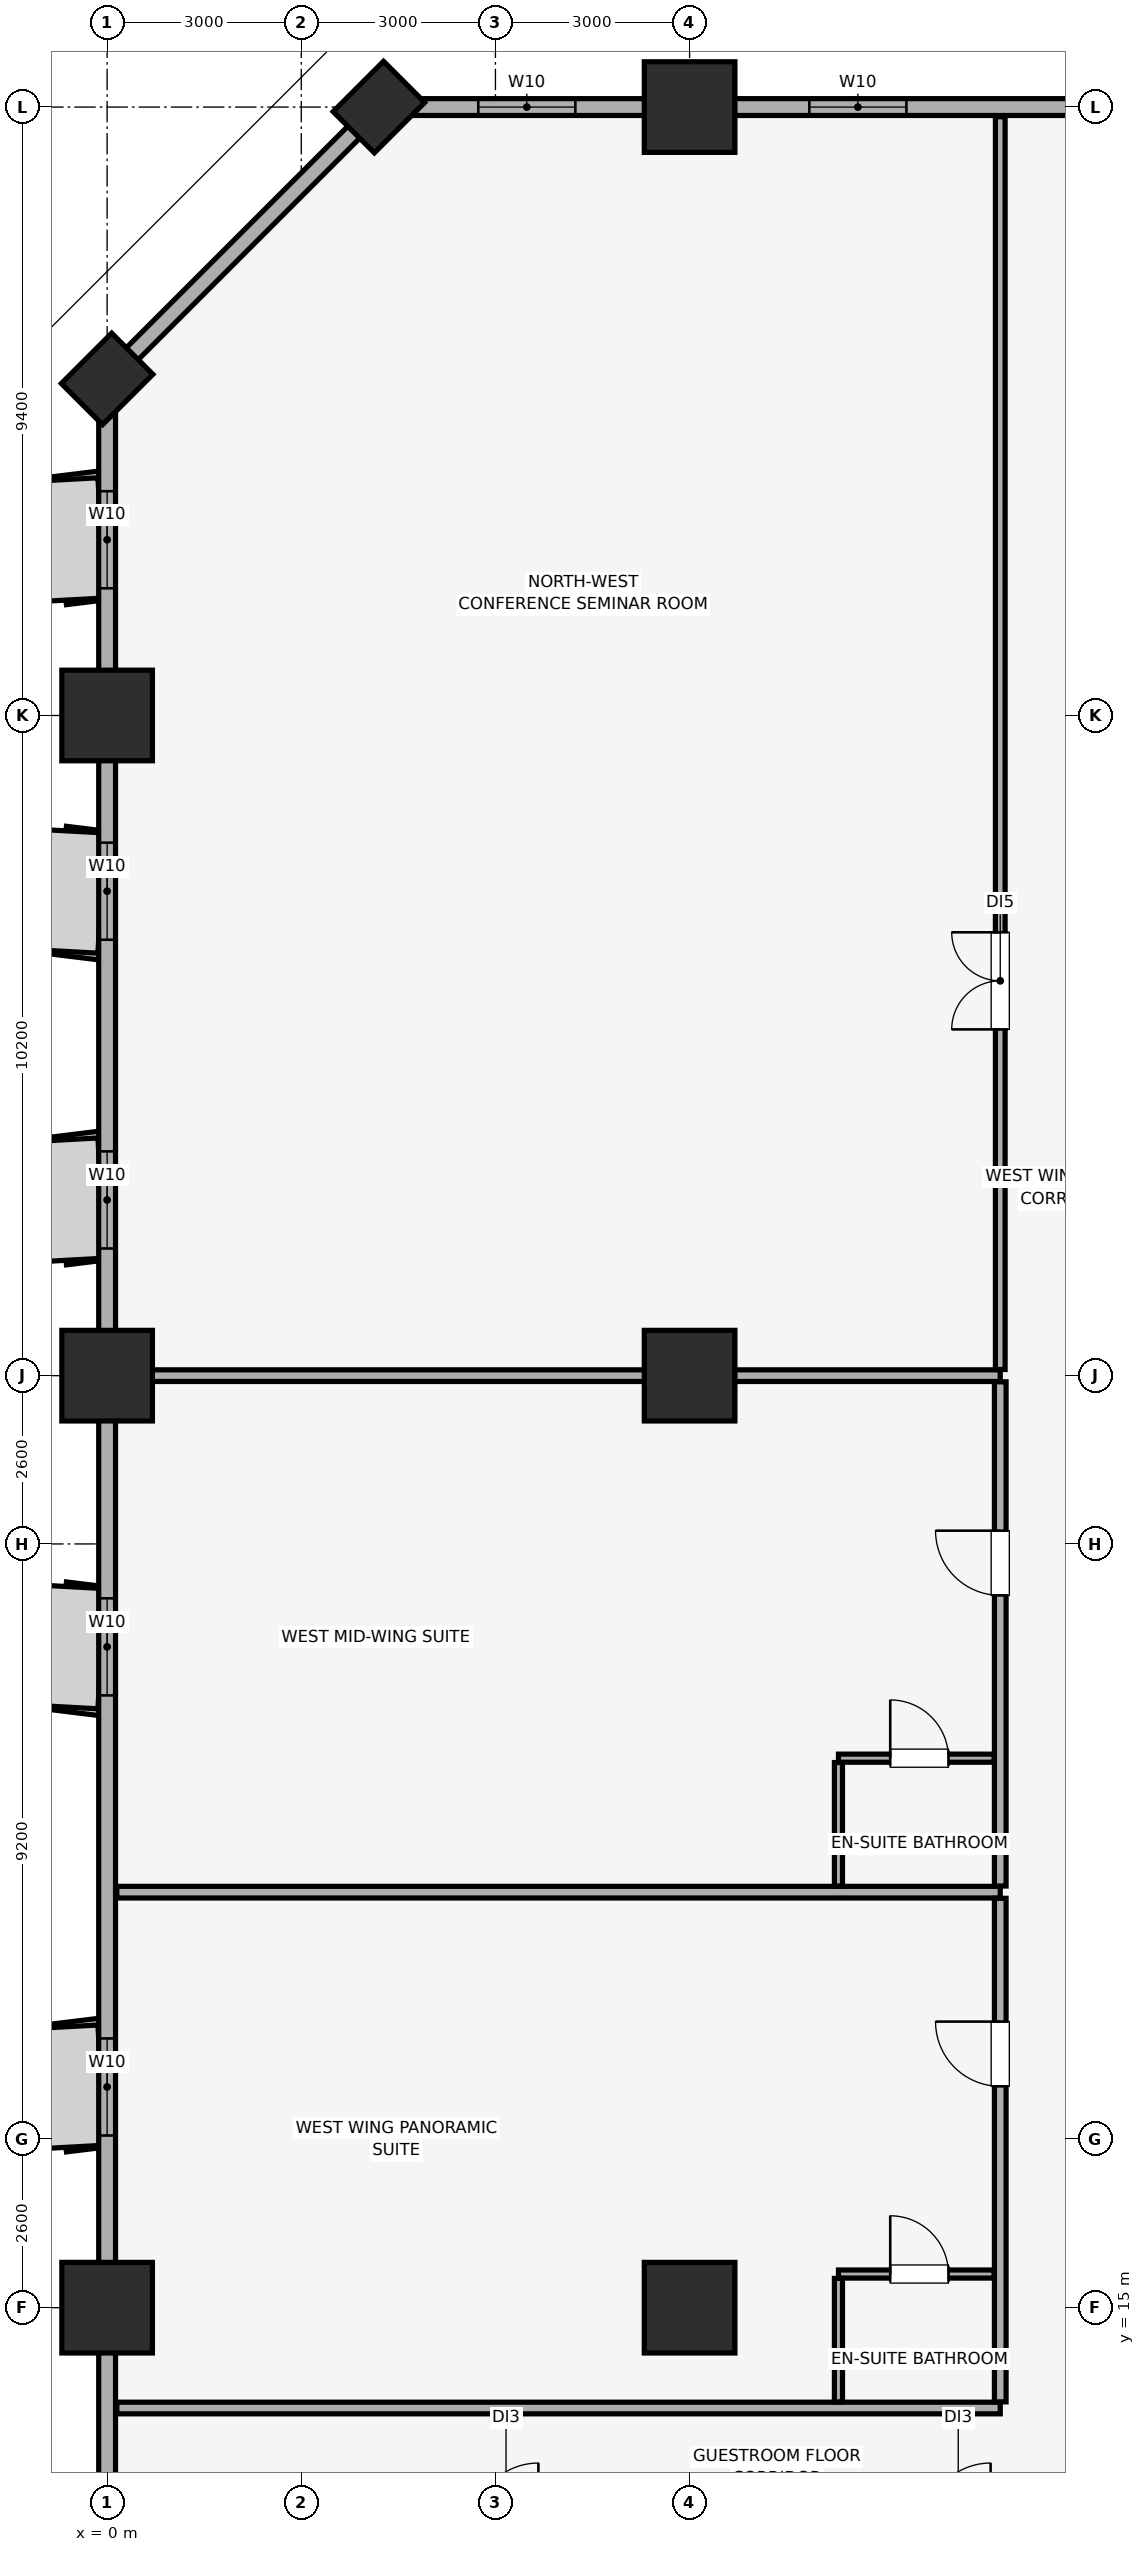
"""IFC4 building model, lengths in metres.
Left out: names, types, materials, properties, quantities, classifications, styles, units other than length and angle.
Written with IfcOpenShell. Run it as: python <this file> out.ifc"""

import sys

from ifc_helpers import new_model, si_unit, direction, frame, frame_2d, origin, origin_2d, place, context, subcontext, project, spatial, rectangle, extrude, element, fill, save


model = new_model("IFC4")
c1 = context("Model", 3, precision=1e-05, world=origin(), true_north=direction((0.0, 1.0)))
c2 = subcontext(c1, "Body", "Model", "MODEL_VIEW")
j1 = project(units=[si_unit("LENGTHUNIT", "METRE"), si_unit("PLANEANGLEUNIT", "RADIAN")], contexts=[c1])
p1 = place(None, origin())
s1 = spatial("IfcSite", under=j1, at=p1, CompositionType="ELEMENT")
p2 = place(p1, origin())
s2 = spatial("IfcBuilding", under=s1, at=p2, CompositionType="ELEMENT")
p3 = place(p2, frame((0.0, 0.0, 57.65)))
s3 = spatial("IfcBuildingStorey", under=s2, at=p3, CompositionType="ELEMENT", Elevation=57.65)
for number, where, z_axis, x_axis in (
    (1, (0.0, 15.0, 0.0), (0.0, 0.0, 1.0), (1.0, 0.0, 0.0)),
    (2, (0.0, 29.4, 0.0), (0.0, 0.0, 1.0), (1.0, 0.0, 0.0)),
    (3, (0.0, 39.6, 0.0), (0.0, 0.0, 1.0), (1.0, 0.0, 0.0)),
):
    element("IfcColumn", number, at=place(p3, frame(where, z_axis=z_axis, x_axis=x_axis)), inside=s3, PredefinedType="COLUMN", context=c2, shape_type="SweptSolid", body=[
        extrude(rectangle(XDim=1.4, YDim=1.4, at=origin_2d()), origin(), (0.0, 0.0, 1.0), 3.51),
    ])
for number, where, z_axis, x_axis in (
    (4, (4.2, 49.0, 0.0), (0.0, 0.0, 1.0), (0.707, 0.707, 0.0)),
    (5, (0.0, 44.8, 0.0), (0.0, 0.0, 1.0), (0.707, 0.707, 0.0)),
):
    element("IfcColumn", number, at=place(p3, frame(where, z_axis=z_axis, x_axis=x_axis)), inside=s3, PredefinedType="PILASTER", context=c2, shape_type="SweptSolid", body=[
        extrude(rectangle(XDim=1.1, YDim=0.9, at=origin_2d()), origin(), (0.0, 0.0, 1.0), 3.51),
    ])
for number, where, z_axis, x_axis in (
    (6, (9.0, 15.0, 0.0), (0.0, 0.0, 1.0), (1.0, 0.0, 0.0)),
    (7, (9.0, 29.4, 0.0), (0.0, 0.0, 1.0), (1.0, 0.0, 0.0)),
    (8, (9.0, 49.0, 0.0), (0.0, 0.0, 1.0), (1.0, 0.0, 0.0)),
):
    element("IfcColumn", number, at=place(p3, frame(where, z_axis=z_axis, x_axis=x_axis)), inside=s3, PredefinedType="COLUMN", context=c2, shape_type="SweptSolid", body=[
        extrude(rectangle(XDim=1.4, YDim=1.4, at=origin_2d()), origin(), (0.0, 0.0, 1.0), 3.51),
    ])
p4 = place(p3, frame((79.8, 49.0, 0.0), z_axis=(0.0, 0.0, 1.0), x_axis=(-1.0, 0.0, 0.0)))
e9 = element("IfcWall", 9, at=p4, inside=s3, PredefinedType="SOLIDWALL", context=c2, shape_type="SweptSolid", body=[
    extrude(rectangle(XDim=75.6, YDim=0.26, at=frame_2d((37.8, 0.0))), origin(), (0.0, 0.0, 1.0), 2.56),
])
p5 = place(p4, frame((72.565, 0.0, 0.85)))
e10 = element("IfcOpeningElement", 10, at=p5, cuts=e9, PredefinedType="OPENING", context=c2, shape_type="SweptSolid", body=[
    extrude(rectangle(XDim=1.5, YDim=1.4, at=frame_2d((0.75, 0.7))), frame((0.0, 0.14, 0.0), z_axis=(0.0, -1.0, 0.0), x_axis=(1.0, 0.0, 0.0)), (0.0, 0.0, 1.0), 0.28),
])
p6 = place(p4, frame((67.45, 0.0, 0.85)))
e11 = element("IfcOpeningElement", 11, at=p6, cuts=e9, PredefinedType="OPENING", context=c2, shape_type="SweptSolid", body=[
    extrude(rectangle(XDim=1.5, YDim=1.4, at=frame_2d((0.75, 0.7))), frame((0.0, 0.14, 0.0), z_axis=(0.0, -1.0, 0.0), x_axis=(1.0, 0.0, 0.0)), (0.0, 0.0, 1.0), 0.28),
])
p7 = place(p4, frame((7.6, 0.0, 0.85)))
e12 = element("IfcOpeningElement", 12, at=p7, cuts=e9, PredefinedType="OPENING", context=c2, shape_type="SweptSolid", body=[
    extrude(rectangle(XDim=1.5, YDim=1.4, at=frame_2d((0.75, 0.7))), frame((0.0, 0.14, 0.0), z_axis=(0.0, -1.0, 0.0), x_axis=(1.0, 0.0, 0.0)), (0.0, 0.0, 1.0), 0.28),
])
p8 = place(p4, frame((1.535, 0.0, 0.85)))
e13 = element("IfcOpeningElement", 13, at=p8, cuts=e9, PredefinedType="OPENING", context=c2, shape_type="SweptSolid", body=[
    extrude(rectangle(XDim=1.5, YDim=1.4, at=frame_2d((0.75, 0.7))), frame((0.0, 0.14, 0.0), z_axis=(0.0, -1.0, 0.0), x_axis=(1.0, 0.0, 0.0)), (0.0, 0.0, 1.0), 0.28),
])
p9 = place(p4, frame((52.265, 0.0, 0.9)))
e14 = element("IfcOpeningElement", 14, at=p9, cuts=e9, PredefinedType="OPENING", context=c2, shape_type="SweptSolid", body=[
    extrude(rectangle(XDim=1.5, YDim=1.4, at=frame_2d((0.75, 0.7))), frame((0.0, 0.14, 0.0), z_axis=(0.0, -1.0, 0.0), x_axis=(1.0, 0.0, 0.0)), (0.0, 0.0, 1.0), 0.28),
])
p10 = place(p4, frame((45.5, 0.0, 0.9)))
e15 = element("IfcOpeningElement", 15, at=p10, cuts=e9, PredefinedType="OPENING", context=c2, shape_type="SweptSolid", body=[
    extrude(rectangle(XDim=1.5, YDim=1.4, at=frame_2d((0.75, 0.7))), frame((0.0, 0.14, 0.0), z_axis=(0.0, -1.0, 0.0), x_axis=(1.0, 0.0, 0.0)), (0.0, 0.0, 1.0), 0.28),
])
p11 = place(p4, frame((31.05, 0.0, 0.9)))
e16 = element("IfcOpeningElement", 16, at=p11, cuts=e9, PredefinedType="OPENING", context=c2, shape_type="SweptSolid", body=[
    extrude(rectangle(XDim=1.5, YDim=1.4, at=frame_2d((0.75, 0.7))), frame((0.0, 0.14, 0.0), z_axis=(0.0, -1.0, 0.0), x_axis=(1.0, 0.0, 0.0)), (0.0, 0.0, 1.0), 0.28),
])
p12 = place(p4, frame((27.85, 0.0, 0.9)))
e17 = element("IfcOpeningElement", 17, at=p12, cuts=e9, PredefinedType="OPENING", context=c2, shape_type="SweptSolid", body=[
    extrude(rectangle(XDim=1.5, YDim=1.4, at=frame_2d((0.75, 0.7))), frame((0.0, 0.14, 0.0), z_axis=(0.0, -1.0, 0.0), x_axis=(1.0, 0.0, 0.0)), (0.0, 0.0, 1.0), 0.28),
])
p13 = place(p4, frame((23.485, 0.0, 0.9)))
e18 = element("IfcOpeningElement", 18, at=p13, cuts=e9, PredefinedType="OPENING", context=c2, shape_type="SweptSolid", body=[
    extrude(rectangle(XDim=1.5, YDim=1.4, at=frame_2d((0.75, 0.7))), frame((0.0, 0.14, 0.0), z_axis=(0.0, -1.0, 0.0), x_axis=(1.0, 0.0, 0.0)), (0.0, 0.0, 1.0), 0.28),
])
p14 = place(p3, frame((4.2, 49.0, 0.0), z_axis=(0.0, 0.0, 1.0), x_axis=(-0.707106781187, -0.707106781187, 0.0)))
e19 = element("IfcWall", 19, at=p14, inside=s3, PredefinedType="SOLIDWALL", context=c2, shape_type="SweptSolid", body=[
    extrude(rectangle(XDim=5.94, YDim=0.26, at=frame_2d((2.97, 0.0))), origin(), (0.0, 0.0, 1.0), 2.56),
])
p15 = place(p3, frame((0.0, 44.8, 0.0), z_axis=(0.0, 0.0, 1.0), x_axis=(0.0, -1.0, 0.0)))
e20 = element("IfcWall", 20, at=p15, inside=s3, PredefinedType="SOLIDWALL", context=c2, shape_type="SweptSolid", body=[
    extrude(rectangle(XDim=40.6, YDim=0.26, at=frame_2d((20.3, 0.0))), origin(), (0.0, 0.0, 1.0), 2.56),
])
p16 = place(p15, frame((34.55, 0.0, 0.85)))
e21 = element("IfcOpeningElement", 21, at=p16, cuts=e20, PredefinedType="OPENING", context=c2, shape_type="SweptSolid", body=[
    extrude(rectangle(XDim=1.5, YDim=1.4, at=frame_2d((0.75, 0.7))), frame((0.0, 0.14, 0.0), z_axis=(0.0, -1.0, 0.0), x_axis=(1.0, 0.0, 0.0)), (0.0, 0.0, 1.0), 0.28),
])
p17 = place(p15, frame((25.64, 0.0, 0.85)))
e22 = element("IfcOpeningElement", 22, at=p17, cuts=e20, PredefinedType="OPENING", context=c2, shape_type="SweptSolid", body=[
    extrude(rectangle(XDim=1.5, YDim=1.4, at=frame_2d((0.75, 0.7))), frame((0.0, 0.14, 0.0), z_axis=(0.0, -1.0, 0.0), x_axis=(1.0, 0.0, 0.0)), (0.0, 0.0, 1.0), 0.28),
])
p18 = place(p15, frame((18.84, 0.0, 0.85)))
e23 = element("IfcOpeningElement", 23, at=p18, cuts=e20, PredefinedType="OPENING", context=c2, shape_type="SweptSolid", body=[
    extrude(rectangle(XDim=1.5, YDim=1.4, at=frame_2d((0.75, 0.7))), frame((0.0, 0.14, 0.0), z_axis=(0.0, -1.0, 0.0), x_axis=(1.0, 0.0, 0.0)), (0.0, 0.0, 1.0), 0.28),
])
p19 = place(p15, frame((11.935, 0.0, 0.85)))
e24 = element("IfcOpeningElement", 24, at=p19, cuts=e20, PredefinedType="OPENING", context=c2, shape_type="SweptSolid", body=[
    extrude(rectangle(XDim=1.5, YDim=1.4, at=frame_2d((0.75, 0.7))), frame((0.0, 0.14, 0.0), z_axis=(0.0, -1.0, 0.0), x_axis=(1.0, 0.0, 0.0)), (0.0, 0.0, 1.0), 0.28),
])
p20 = place(p15, frame((7.165, 0.0, 0.85)))
e25 = element("IfcOpeningElement", 25, at=p20, cuts=e20, PredefinedType="OPENING", context=c2, shape_type="SweptSolid", body=[
    extrude(rectangle(XDim=1.5, YDim=1.4, at=frame_2d((0.75, 0.7))), frame((0.0, 0.14, 0.0), z_axis=(0.0, -1.0, 0.0), x_axis=(1.0, 0.0, 0.0)), (0.0, 0.0, 1.0), 0.28),
])
p21 = place(p15, frame((1.735, 0.0, 0.85)))
e26 = element("IfcOpeningElement", 26, at=p21, cuts=e20, PredefinedType="OPENING", context=c2, shape_type="SweptSolid", body=[
    extrude(rectangle(XDim=1.5, YDim=1.4, at=frame_2d((0.75, 0.7))), frame((0.0, 0.14, 0.0), z_axis=(0.0, -1.0, 0.0), x_axis=(1.0, 0.0, 0.0)), (0.0, 0.0, 1.0), 0.28),
])
for number, where, z_axis, x_axis in (
    (27, (0.15, 13.45, 0.0), (0.0, 0.0, 1.0), (1.0, 0.0, 0.0)),
    (28, (0.15, 21.42, 0.0), (0.0, 0.0, 1.0), (1.0, 0.0, 0.0)),
):
    element("IfcWall", number, at=place(p3, frame(where, z_axis=z_axis, x_axis=x_axis)), inside=s3, PredefinedType="PARTITIONING", context=c2, shape_type="SweptSolid", body=[
        extrude(rectangle(XDim=13.65, YDim=0.18, at=frame_2d((6.825, 0.0))), origin(), (0.0, 0.0, 1.0), 3.51),
    ])
p22 = place(p3, frame((13.8, 13.545, 0.0), z_axis=(0.0, 0.0, 1.0), x_axis=(0.0, 1.0, 0.0)))
e29 = element("IfcWall", 29, at=p22, inside=s3, PredefinedType="PARTITIONING", context=c2, shape_type="SweptSolid", body=[
    extrude(rectangle(XDim=7.78, YDim=0.18, at=frame_2d((3.89, 0.0))), origin(), (0.0, 0.0, 1.0), 3.51),
])
p23 = place(p22, frame((4.875, 0.0, 0.0)))
e30 = element("IfcOpeningElement", 30, at=p23, cuts=e29, PredefinedType="OPENING", context=c2, shape_type="SweptSolid", body=[
    extrude(rectangle(XDim=1.0, YDim=2.15, at=frame_2d((0.5, 1.075))), frame((0.0, 0.1, 0.0), z_axis=(0.0, -1.0, 0.0), x_axis=(1.0, 0.0, 0.0)), (0.0, 0.0, 1.0), 0.2),
])
p24 = place(p3, frame((11.3, 15.52, 0.0), z_axis=(0.0, 0.0, 1.0), x_axis=(1.0, 0.0, 0.0)))
e31 = element("IfcWall", 31, at=p24, inside=s3, PredefinedType="PARTITIONING", context=c2, shape_type="SweptSolid", body=[
    extrude(rectangle(XDim=2.405, YDim=0.125, at=frame_2d((1.203, 0.0))), origin(), (0.0, 0.0, 1.0), 3.51),
])
p25 = place(p24, frame((0.8, 0.0, 0.0)))
e32 = element("IfcOpeningElement", 32, at=p25, cuts=e31, PredefinedType="OPENING", context=c2, shape_type="SweptSolid", body=[
    extrude(rectangle(XDim=0.9, YDim=2.1, at=frame_2d((0.45, 1.05))), frame((0.0, 0.073, 0.0), z_axis=(0.0, -1.0, 0.0), x_axis=(1.0, 0.0, 0.0)), (0.0, 0.0, 1.0), 0.145),
])
p26 = place(p3, frame((11.3, 13.545, 0.0), z_axis=(0.0, 0.0, 1.0), x_axis=(0.0, 1.0, 0.0)))
e33 = element("IfcWall", 33, at=p26, inside=s3, PredefinedType="PARTITIONING", context=c2, shape_type="SweptSolid", body=[
    extrude(rectangle(XDim=1.907, YDim=0.125, at=frame_2d((0.954, 0.0))), origin(), (0.0, 0.0, 1.0), 3.51),
])
p27 = place(p3, frame((0.15, 29.4, 0.0), z_axis=(0.0, 0.0, 1.0), x_axis=(1.0, 0.0, 0.0)))
e34 = element("IfcWall", 34, at=p27, inside=s3, PredefinedType="PARTITIONING", context=c2, shape_type="SweptSolid", body=[
    extrude(rectangle(XDim=13.65, YDim=0.18, at=frame_2d((6.825, 0.0))), origin(), (0.0, 0.0, 1.0), 2.86),
])
p28 = place(p3, frame((13.8, 21.515, 0.0), z_axis=(0.0, 0.0, 1.0), x_axis=(0.0, 1.0, 0.0)))
e35 = element("IfcWall", 35, at=p28, inside=s3, PredefinedType="PARTITIONING", context=c2, shape_type="SweptSolid", body=[
    extrude(rectangle(XDim=7.79, YDim=0.18, at=frame_2d((3.895, 0.0))), origin(), (0.0, 0.0, 1.0), 3.51),
])
p29 = place(p28, frame((4.49, 0.0, 0.0)))
e36 = element("IfcOpeningElement", 36, at=p29, cuts=e35, PredefinedType="OPENING", context=c2, shape_type="SweptSolid", body=[
    extrude(rectangle(XDim=1.0, YDim=2.15, at=frame_2d((0.5, 1.075))), frame((0.0, 0.1, 0.0), z_axis=(0.0, -1.0, 0.0), x_axis=(1.0, 0.0, 0.0)), (0.0, 0.0, 1.0), 0.2),
])
p30 = place(p3, frame((11.3, 23.49, 0.0), z_axis=(0.0, 0.0, 1.0), x_axis=(1.0, 0.0, 0.0)))
e37 = element("IfcWall", 37, at=p30, inside=s3, PredefinedType="PARTITIONING", context=c2, shape_type="SweptSolid", body=[
    extrude(rectangle(XDim=2.405, YDim=0.125, at=frame_2d((1.203, 0.0))), origin(), (0.0, 0.0, 1.0), 3.51),
])
p31 = place(p30, frame((0.8, 0.0, 0.0)))
e38 = element("IfcOpeningElement", 38, at=p31, cuts=e37, PredefinedType="OPENING", context=c2, shape_type="SweptSolid", body=[
    extrude(rectangle(XDim=0.9, YDim=2.1, at=frame_2d((0.45, 1.05))), frame((0.0, 0.073, 0.0), z_axis=(0.0, -1.0, 0.0), x_axis=(1.0, 0.0, 0.0)), (0.0, 0.0, 1.0), 0.145),
])
p32 = place(p3, frame((11.3, 21.515, 0.0), z_axis=(0.0, 0.0, 1.0), x_axis=(0.0, 1.0, 0.0)))
e39 = element("IfcWall", 39, at=p32, inside=s3, PredefinedType="PARTITIONING", context=c2, shape_type="SweptSolid", body=[
    extrude(rectangle(XDim=1.908, YDim=0.125, at=frame_2d((0.954, 0.0))), origin(), (0.0, 0.0, 1.0), 3.51),
])
p33 = place(p3, frame((13.8, 29.495, 0.0), z_axis=(0.0, 0.0, 1.0), x_axis=(0.0, 1.0, 0.0)))
e40 = element("IfcWall", 40, at=p33, inside=s3, PredefinedType="PARTITIONING", context=c2, shape_type="SweptSolid", body=[
    extrude(rectangle(XDim=19.355, YDim=0.15, at=frame_2d((9.677, 0.0))), origin(), (0.0, 0.0, 1.0), 3.51),
])
p34 = place(p33, frame((5.255, 0.0, 0.0)))
e41 = element("IfcOpeningElement", 41, at=p34, cuts=e40, PredefinedType="OPENING", context=c2, shape_type="SweptSolid", body=[
    extrude(rectangle(XDim=1.5, YDim=2.25, at=frame_2d((0.75, 1.125))), frame((0.0, 0.085, 0.0), z_axis=(0.0, -1.0, 0.0), x_axis=(1.0, 0.0, 0.0)), (0.0, 0.0, 1.0), 0.17),
])
p35 = place(p17, origin())
e42 = element("IfcWindow", 42, at=p35, inside=s3, PartitioningType="SINGLE_PANEL", PredefinedType="WINDOW", context=c2, shape_type="SweptSolid", body=[
    extrude(rectangle(XDim=1.5, YDim=1.4, at=frame_2d((0.75, 0.7))), frame((0.0, 0.03, 0.0), z_axis=(0.0, -1.0, 0.0), x_axis=(1.0, 0.0, 0.0)), (0.0, 0.0, 1.0), 0.06),
])
fill(e22, e42)
p36 = place(p18, origin())
e43 = element("IfcWindow", 43, at=p36, inside=s3, PartitioningType="SINGLE_PANEL", PredefinedType="WINDOW", context=c2, shape_type="SweptSolid", body=[
    extrude(rectangle(XDim=1.5, YDim=1.4, at=frame_2d((0.75, 0.7))), frame((0.0, 0.03, 0.0), z_axis=(0.0, -1.0, 0.0), x_axis=(1.0, 0.0, 0.0)), (0.0, 0.0, 1.0), 0.06),
])
fill(e23, e43)
p37 = place(p19, origin())
e44 = element("IfcWindow", 44, at=p37, inside=s3, PartitioningType="SINGLE_PANEL", PredefinedType="WINDOW", context=c2, shape_type="SweptSolid", body=[
    extrude(rectangle(XDim=1.5, YDim=1.4, at=frame_2d((0.75, 0.7))), frame((0.0, 0.03, 0.0), z_axis=(0.0, -1.0, 0.0), x_axis=(1.0, 0.0, 0.0)), (0.0, 0.0, 1.0), 0.06),
])
fill(e24, e44)
p38 = place(p20, origin())
e45 = element("IfcWindow", 45, at=p38, inside=s3, PartitioningType="SINGLE_PANEL", PredefinedType="WINDOW", context=c2, shape_type="SweptSolid", body=[
    extrude(rectangle(XDim=1.5, YDim=1.4, at=frame_2d((0.75, 0.7))), frame((0.0, 0.03, 0.0), z_axis=(0.0, -1.0, 0.0), x_axis=(1.0, 0.0, 0.0)), (0.0, 0.0, 1.0), 0.06),
])
fill(e25, e45)
p39 = place(p21, origin())
e46 = element("IfcWindow", 46, at=p39, inside=s3, PartitioningType="SINGLE_PANEL", PredefinedType="WINDOW", context=c2, shape_type="SweptSolid", body=[
    extrude(rectangle(XDim=1.5, YDim=1.4, at=frame_2d((0.75, 0.7))), frame((0.0, 0.03, 0.0), z_axis=(0.0, -1.0, 0.0), x_axis=(1.0, 0.0, 0.0)), (0.0, 0.0, 1.0), 0.06),
])
fill(e26, e46)
p40 = place(p5, origin())
e47 = element("IfcWindow", 47, at=p40, inside=s3, PartitioningType="SINGLE_PANEL", PredefinedType="WINDOW", context=c2, shape_type="SweptSolid", body=[
    extrude(rectangle(XDim=1.5, YDim=1.4, at=frame_2d((0.75, 0.7))), frame((0.0, 0.03, 0.0), z_axis=(0.0, -1.0, 0.0), x_axis=(1.0, 0.0, 0.0)), (0.0, 0.0, 1.0), 0.06),
])
fill(e10, e47)
p41 = place(p6, origin())
e48 = element("IfcWindow", 48, at=p41, inside=s3, PartitioningType="SINGLE_PANEL", PredefinedType="WINDOW", context=c2, shape_type="SweptSolid", body=[
    extrude(rectangle(XDim=1.5, YDim=1.4, at=frame_2d((0.75, 0.7))), frame((0.0, 0.03, 0.0), z_axis=(0.0, -1.0, 0.0), x_axis=(1.0, 0.0, 0.0)), (0.0, 0.0, 1.0), 0.06),
])
fill(e11, e48)
p42 = place(p23, origin())
e49 = element("IfcDoor", 49, at=p42, inside=s3, OperationType="SINGLE_SWING_RIGHT", PredefinedType="DOOR", context=c2, shape_type="SweptSolid", body=[
    extrude(rectangle(XDim=1.0, YDim=2.15, at=frame_2d((0.5, 1.075))), frame((0.0, 0.025, 0.0), z_axis=(0.0, -1.0, 0.0), x_axis=(1.0, 0.0, 0.0)), (0.0, 0.0, 1.0), 0.05),
])
fill(e30, e49)
p43 = place(p25, origin())
e50 = element("IfcDoor", 50, at=p43, inside=s3, OperationType="SINGLE_SWING_LEFT", PredefinedType="DOOR", context=c2, shape_type="SweptSolid", body=[
    extrude(rectangle(XDim=0.9, YDim=2.1, at=frame_2d((0.45, 1.05))), frame((0.0, 0.025, 0.0), z_axis=(0.0, -1.0, 0.0), x_axis=(1.0, 0.0, 0.0)), (0.0, 0.0, 1.0), 0.05),
])
fill(e32, e50)
p44 = place(p29, origin())
e51 = element("IfcDoor", 51, at=p44, inside=s3, OperationType="SINGLE_SWING_RIGHT", PredefinedType="DOOR", context=c2, shape_type="SweptSolid", body=[
    extrude(rectangle(XDim=1.0, YDim=2.15, at=frame_2d((0.5, 1.075))), frame((0.0, 0.025, 0.0), z_axis=(0.0, -1.0, 0.0), x_axis=(1.0, 0.0, 0.0)), (0.0, 0.0, 1.0), 0.05),
])
fill(e36, e51)
p45 = place(p31, origin())
e52 = element("IfcDoor", 52, at=p45, inside=s3, OperationType="SINGLE_SWING_LEFT", PredefinedType="DOOR", context=c2, shape_type="SweptSolid", body=[
    extrude(rectangle(XDim=0.9, YDim=2.1, at=frame_2d((0.45, 1.05))), frame((0.0, 0.025, 0.0), z_axis=(0.0, -1.0, 0.0), x_axis=(1.0, 0.0, 0.0)), (0.0, 0.0, 1.0), 0.05),
])
fill(e38, e52)
p46 = place(p34, origin())
e53 = element("IfcDoor", 53, at=p46, inside=s3, OperationType="DOUBLE_DOOR_SINGLE_SWING", PredefinedType="DOOR", context=c2, shape_type="SweptSolid", body=[
    extrude(rectangle(XDim=1.5, YDim=2.25, at=frame_2d((0.75, 1.125))), frame((0.0, 0.025, 0.0), z_axis=(0.0, -1.0, 0.0), x_axis=(1.0, 0.0, 0.0)), (0.0, 0.0, 1.0), 0.05),
])
fill(e41, e53)
save(model, sys.argv[1])
